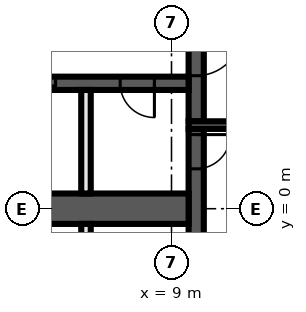
"""IFC4 building model, lengths in metres.
Left out: names, types, materials, properties, quantities, classifications, styles, units other than length and angle.
Written with IfcOpenShell. Run it as: python <this file> out.ifc"""

import sys

from ifc_helpers import new_model, si_unit, direction, frame, frame_2d, origin, place, context, subcontext, project, spatial, rectangle, extrude, element, fill, save


model = new_model("IFC4")
c1 = context("Model", 3, precision=1e-05, world=origin(), true_north=direction((0.0, 1.0)))
c2 = subcontext(c1, "Body", "Model", "MODEL_VIEW")
j1 = project(units=[si_unit("LENGTHUNIT", "METRE"), si_unit("PLANEANGLEUNIT", "RADIAN")], contexts=[c1])
p1 = place(None, origin())
s1 = spatial("IfcSite", under=j1, at=p1, CompositionType="ELEMENT")
p2 = place(p1, origin())
s2 = spatial("IfcBuilding", under=s1, at=p2, CompositionType="ELEMENT")
p3 = place(p2, frame((0.0, 0.0, 132.2)))
s3 = spatial("IfcBuildingStorey", under=s2, at=p3, CompositionType="ELEMENT", Elevation=132.2)
p4 = place(p3, frame((9.65, 2.1, 0.0), z_axis=(0.0, 0.0, 1.0), x_axis=(0.0, -1.0, 0.0)))
e1 = element("IfcWall", 1, at=p4, inside=s3, PredefinedType="SHEAR", context=c2, shape_type="SweptSolid", body=[
    extrude(rectangle(XDim=4.2, YDim=0.4, at=frame_2d((2.1, 0.0))), origin(), (0.0, 0.0, 1.0), 3.3),
])
p5 = place(p4, frame((0.15, 0.0, 0.0)))
e2 = element("IfcOpeningElement", 2, at=p5, cuts=e1, PredefinedType="OPENING", context=c2, shape_type="SweptSolid", body=[
    extrude(rectangle(XDim=0.9, YDim=2.1, at=frame_2d((0.45, 1.05))), frame((0.0, 0.21, 0.0), z_axis=(0.0, -1.0, 0.0), x_axis=(1.0, 0.0, 0.0)), (0.0, 0.0, 1.0), 0.42),
])
p6 = place(p3, frame((9.65, 9.8, 0.0), z_axis=(0.0, 0.0, 1.0), x_axis=(0.0, -1.0, 0.0)))
e3 = element("IfcWall", 3, at=p6, inside=s3, PredefinedType="SHEAR", context=c2, shape_type="SweptSolid", body=[
    extrude(rectangle(XDim=7.5, YDim=0.4, at=frame_2d((3.75, 0.0))), origin(), (0.0, 0.0, 1.0), 3.3),
])
p7 = place(p6, frame((5.1, 0.0, 0.0)))
e4 = element("IfcOpeningElement", 4, at=p7, cuts=e3, PredefinedType="OPENING", context=c2, shape_type="SweptSolid", body=[
    extrude(rectangle(XDim=1.2, YDim=2.1, at=frame_2d((0.6, 1.05))), frame((0.0, 0.21, 0.0), z_axis=(0.0, -1.0, 0.0), x_axis=(1.0, 0.0, 0.0)), (0.0, 0.0, 1.0), 0.42),
])
p8 = place(p3, frame((9.45, 2.2, 0.0), z_axis=(0.0, 0.0, 1.0), x_axis=(1.0, 0.0, 0.0)))
e5 = element("IfcWall", 5, at=p8, inside=s3, PredefinedType="SHEAR", context=c2, shape_type="SweptSolid", body=[
    extrude(rectangle(XDim=3.35, YDim=0.2, at=frame_2d((1.675, 0.0))), origin(), (0.0, 0.0, 1.0), 3.3),
])
p9 = place(p3, frame((9.45, 3.3, 0.0), z_axis=(0.0, 0.0, 1.0), x_axis=(-1.0, 0.0, 0.0)))
e6 = element("IfcWall", 6, at=p9, inside=s3, PredefinedType="SHEAR", context=c2, shape_type="SweptSolid", body=[
    extrude(rectangle(XDim=18.9, YDim=0.35, at=frame_2d((9.45, 0.0))), origin(), (0.0, 0.0, 1.0), 3.3),
])
p10 = place(p9, frame((17.0, 0.0, 0.0)))
e7 = element("IfcOpeningElement", 7, at=p10, cuts=e6, PredefinedType="OPENING", context=c2, shape_type="SweptSolid", body=[
    extrude(rectangle(XDim=1.1, YDim=2.1, at=frame_2d((0.55, 1.05))), frame((0.0, 0.185, 0.0), z_axis=(0.0, -1.0, 0.0), x_axis=(1.0, 0.0, 0.0)), (0.0, 0.0, 1.0), 0.37),
])
p11 = place(p9, frame((14.3, 0.0, 0.0)))
e8 = element("IfcOpeningElement", 8, at=p11, cuts=e6, PredefinedType="OPENING", context=c2, shape_type="SweptSolid", body=[
    extrude(rectangle(XDim=1.1, YDim=2.1, at=frame_2d((0.55, 1.05))), frame((0.0, 0.185, 0.0), z_axis=(0.0, -1.0, 0.0), x_axis=(1.0, 0.0, 0.0)), (0.0, 0.0, 1.0), 0.37),
])
p12 = place(p9, frame((11.6, 0.0, 0.0)))
e9 = element("IfcOpeningElement", 9, at=p12, cuts=e6, PredefinedType="OPENING", context=c2, shape_type="SweptSolid", body=[
    extrude(rectangle(XDim=1.1, YDim=2.1, at=frame_2d((0.55, 1.05))), frame((0.0, 0.185, 0.0), z_axis=(0.0, -1.0, 0.0), x_axis=(1.0, 0.0, 0.0)), (0.0, 0.0, 1.0), 0.37),
])
p13 = place(p9, frame((8.9, 0.0, 0.0)))
e10 = element("IfcOpeningElement", 10, at=p13, cuts=e6, PredefinedType="OPENING", context=c2, shape_type="SweptSolid", body=[
    extrude(rectangle(XDim=1.1, YDim=2.1, at=frame_2d((0.55, 1.05))), frame((0.0, 0.185, 0.0), z_axis=(0.0, -1.0, 0.0), x_axis=(1.0, 0.0, 0.0)), (0.0, 0.0, 1.0), 0.37),
])
p14 = place(p9, frame((6.2, 0.0, 0.0)))
e11 = element("IfcOpeningElement", 11, at=p14, cuts=e6, PredefinedType="OPENING", context=c2, shape_type="SweptSolid", body=[
    extrude(rectangle(XDim=1.1, YDim=2.1, at=frame_2d((0.55, 1.05))), frame((0.0, 0.185, 0.0), z_axis=(0.0, -1.0, 0.0), x_axis=(1.0, 0.0, 0.0)), (0.0, 0.0, 1.0), 0.37),
])
p15 = place(p9, frame((3.5, 0.0, 0.0)))
e12 = element("IfcOpeningElement", 12, at=p15, cuts=e6, PredefinedType="OPENING", context=c2, shape_type="SweptSolid", body=[
    extrude(rectangle(XDim=1.1, YDim=2.1, at=frame_2d((0.55, 1.05))), frame((0.0, 0.185, 0.0), z_axis=(0.0, -1.0, 0.0), x_axis=(1.0, 0.0, 0.0)), (0.0, 0.0, 1.0), 0.37),
])
p16 = place(p9, frame((0.9, 0.0, 0.0)))
e13 = element("IfcOpeningElement", 13, at=p16, cuts=e6, PredefinedType="OPENING", context=c2, shape_type="SweptSolid", body=[
    extrude(rectangle(XDim=0.9, YDim=2.1, at=frame_2d((0.45, 1.05))), frame((0.0, 0.185, 0.0), z_axis=(0.0, -1.0, 0.0), x_axis=(1.0, 0.0, 0.0)), (0.0, 0.0, 1.0), 0.37),
])
p17 = place(p3, frame((-9.45, 0.0, 0.0), z_axis=(0.0, 0.0, 1.0), x_axis=(1.0, 0.0, 0.0)))
e14 = element("IfcWall", 14, at=p17, inside=s3, PredefinedType="SHEAR", context=c2, shape_type="SweptSolid", body=[
    extrude(rectangle(XDim=18.9, YDim=0.8, at=frame_2d((9.45, 0.0))), origin(), (0.0, 0.0, 1.0), 3.3),
])
for number, where, z_axis, x_axis in (
    (15, (6.75, -3.125, 0.0), (0.0, 0.0, 1.0), (0.0, 1.0, 0.0)),
    (16, (6.75, 0.4, 0.0), (0.0, 0.0, 1.0), (0.0, 1.0, 0.0)),
):
    element("IfcWall", number, at=place(p3, frame(where, z_axis=z_axis, x_axis=x_axis)), inside=s3, PredefinedType="SOLIDWALL", context=c2, shape_type="SweptSolid", body=[
        extrude(rectangle(XDim=2.725, YDim=0.25, at=frame_2d((1.363, 0.0))), origin(), (0.0, 0.0, 1.0), 3.3),
    ])
p18 = place(p5, origin())
e17 = element("IfcDoor", 17, at=p18, inside=s3, OperationType="SINGLE_SWING_RIGHT", PredefinedType="DOOR", context=c2, shape_type="SweptSolid", body=[
    extrude(rectangle(XDim=0.9, YDim=2.1, at=frame_2d((0.45, 1.05))), frame((0.0, 0.025, 0.0), z_axis=(0.0, -1.0, 0.0), x_axis=(1.0, 0.0, 0.0)), (0.0, 0.0, 1.0), 0.05),
])
fill(e2, e17)
p19 = place(p15, origin())
e18 = element("IfcDoor", 18, at=p19, inside=s3, OperationType="DOUBLE_DOOR_SLIDING", PredefinedType="DOOR", context=c2, shape_type="SweptSolid", body=[
    extrude(rectangle(XDim=1.1, YDim=2.1, at=frame_2d((0.55, 1.05))), frame((0.0, 0.025, 0.0), z_axis=(0.0, -1.0, 0.0), x_axis=(1.0, 0.0, 0.0)), (0.0, 0.0, 1.0), 0.05),
])
fill(e12, e18)
p20 = place(p16, origin())
e19 = element("IfcDoor", 19, at=p20, inside=s3, OperationType="SINGLE_SWING_LEFT", PredefinedType="DOOR", context=c2, shape_type="SweptSolid", body=[
    extrude(rectangle(XDim=0.9, YDim=2.1, at=frame_2d((0.45, 1.05))), frame((0.0, 0.025, 0.0), z_axis=(0.0, -1.0, 0.0), x_axis=(1.0, 0.0, 0.0)), (0.0, 0.0, 1.0), 0.05),
])
fill(e13, e19)
p21 = place(p7, origin())
e20 = element("IfcDoor", 20, at=p21, inside=s3, OperationType="SINGLE_SWING_LEFT", PredefinedType="DOOR", context=c2, shape_type="SweptSolid", body=[
    extrude(rectangle(XDim=1.2, YDim=2.1, at=frame_2d((0.6, 1.05))), frame((0.0, 0.025, 0.0), z_axis=(0.0, -1.0, 0.0), x_axis=(1.0, 0.0, 0.0)), (0.0, 0.0, 1.0), 0.05),
])
fill(e4, e20)
save(model, sys.argv[1])
